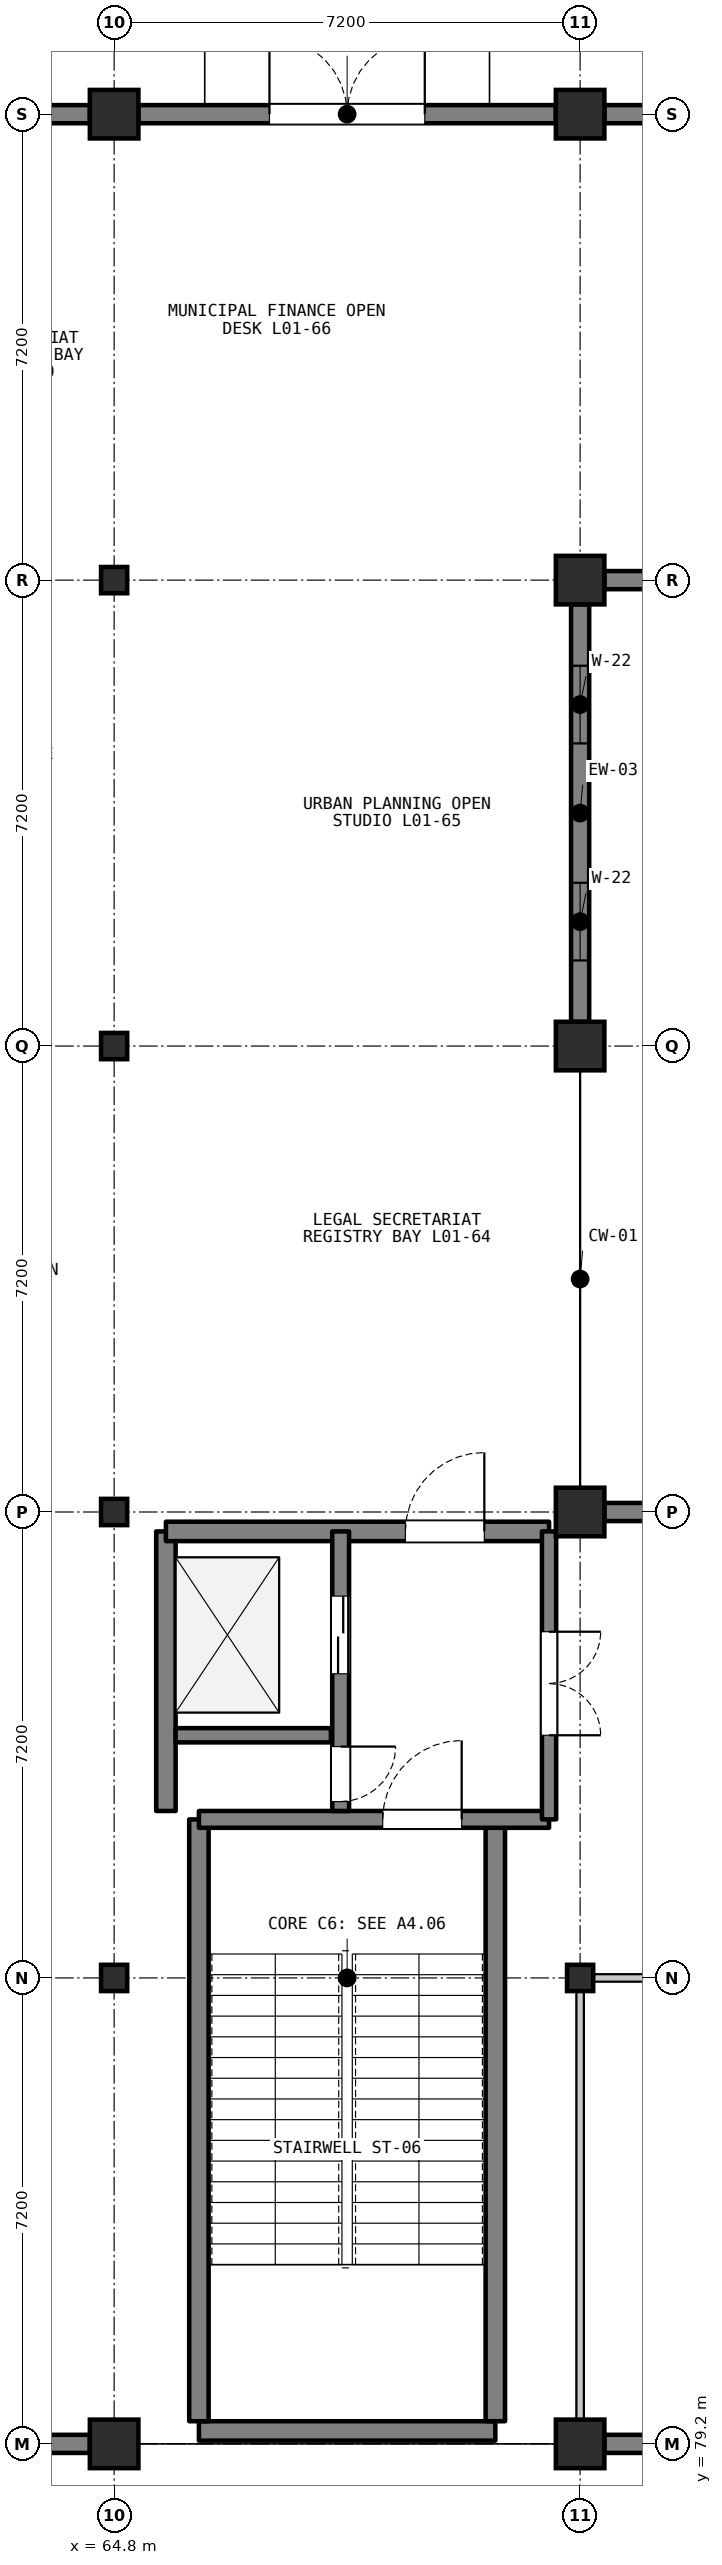
"""IFC4 building model, lengths in metres.
Left out: names, types, materials, properties, quantities, classifications, styles, units other than length and angle.
Written with IfcOpenShell. Run it as: python <this file> out.ifc"""

import sys

from ifc_helpers import new_model, si_unit, direction, frame, frame_2d, origin, origin_2d, place, context, subcontext, project, spatial, rectangle, i_section, extrude, element, fill, save


model = new_model("IFC4")
c1 = context("Model", 3, precision=1e-05, world=origin(), true_north=direction((0.0, 1.0)))
c2 = subcontext(c1, "Body", "Model", "MODEL_VIEW")
j1 = project(units=[si_unit("LENGTHUNIT", "METRE"), si_unit("PLANEANGLEUNIT", "RADIAN")], contexts=[c1])
p1 = place(None, origin())
s1 = spatial("IfcSite", under=j1, at=p1, CompositionType="ELEMENT")
p2 = place(p1, origin())
s2 = spatial("IfcBuilding", under=s1, at=p2, CompositionType="ELEMENT")
p3 = place(p2, origin())
s3 = spatial("IfcBuildingStorey", under=s2, at=p3, CompositionType="ELEMENT", Elevation=0.0)
p4 = place(p3, frame((64.8, 79.2, 0.0), z_axis=(0.0, 0.0, 1.0), x_axis=(1.0, 0.0, 0.0)))
e1 = element("IfcColumn", 1, at=p4, inside=s3, PredefinedType="COLUMN", context=c2, shape_type="SweptSolid", body=[
    extrude(rectangle(XDim=0.75, YDim=0.75, at=origin_2d()), origin(), (0.0, 0.0, 1.0), 5.4),
])
for number, where, z_axis, x_axis in (
    (2, (64.8, 86.4, 0.0), (0.0, 0.0, 1.0), (1.0, 0.0, 0.0)),
    (3, (64.8, 93.6, 0.0), (0.0, 0.0, 1.0), (1.0, 0.0, 0.0)),
    (4, (64.8, 100.8, 0.0), (0.0, 0.0, 1.0), (1.0, 0.0, 0.0)),
    (5, (64.8, 108.0, 0.0), (0.0, 0.0, 1.0), (1.0, 0.0, 0.0)),
):
    element("IfcColumn", number, at=place(p3, frame(where, z_axis=z_axis, x_axis=x_axis)), inside=s3, PredefinedType="COLUMN", context=c2, shape_type="SweptSolid", body=[
        extrude(i_section(OverallWidth=0.404, OverallDepth=0.406, WebThickness=0.027, FlangeThickness=0.044, FilletRadius=0.015, at=origin_2d()), origin(), (0.0, 0.0, 1.0), 5.4),
    ])
for number, where, z_axis, x_axis in (
    (6, (64.8, 115.2, 0.0), (0.0, 0.0, 1.0), (1.0, 0.0, 0.0)),
    (7, (72.0, 79.2, 0.0), (0.0, 0.0, 1.0), (1.0, 0.0, 0.0)),
):
    element("IfcColumn", number, at=place(p3, frame(where, z_axis=z_axis, x_axis=x_axis)), inside=s3, PredefinedType="COLUMN", context=c2, shape_type="SweptSolid", body=[
        extrude(rectangle(XDim=0.75, YDim=0.75, at=origin_2d()), origin(), (0.0, 0.0, 1.0), 5.4),
    ])
p5 = place(p3, frame((72.0, 86.4, 0.0), z_axis=(0.0, 0.0, 1.0), x_axis=(1.0, 0.0, 0.0)))
e8 = element("IfcColumn", 8, at=p5, inside=s3, PredefinedType="COLUMN", context=c2, shape_type="SweptSolid", body=[
    extrude(i_section(OverallWidth=0.404, OverallDepth=0.406, WebThickness=0.027, FlangeThickness=0.044, FilletRadius=0.015, at=origin_2d()), origin(), (0.0, 0.0, 1.0), 5.4),
])
for number, where, z_axis, x_axis in (
    (9, (72.0, 93.6, 0.0), (0.0, 0.0, 1.0), (1.0, 0.0, 0.0)),
    (10, (72.0, 100.8, 0.0), (0.0, 0.0, 1.0), (1.0, 0.0, 0.0)),
    (11, (72.0, 108.0, 0.0), (0.0, 0.0, 1.0), (1.0, 0.0, 0.0)),
    (12, (72.0, 115.2, 0.0), (0.0, 0.0, 1.0), (1.0, 0.0, 0.0)),
):
    element("IfcColumn", number, at=place(p3, frame(where, z_axis=z_axis, x_axis=x_axis)), inside=s3, PredefinedType="COLUMN", context=c2, shape_type="SweptSolid", body=[
        extrude(rectangle(XDim=0.75, YDim=0.75, at=origin_2d()), origin(), (0.0, 0.0, 1.0), 5.4),
    ])
p6 = place(p3, frame((64.425, 79.2, 0.0), z_axis=(0.0, 0.0, 1.0), x_axis=(-1.0, 0.0, 0.0)))
e13 = element("IfcWall", 13, at=p6, inside=s3, PredefinedType="SOLIDWALL", context=c2, shape_type="SweptSolid", body=[
    extrude(rectangle(XDim=6.45, YDim=0.28, at=frame_2d((3.225, 0.0))), origin(), (0.0, 0.0, 1.0), 4.598),
])
p7 = place(p3, frame((57.975, 115.2, 0.0), z_axis=(0.0, 0.0, 1.0), x_axis=(1.0, 0.0, 0.0)))
e14 = element("IfcWall", 14, at=p7, inside=s3, PredefinedType="SOLIDWALL", context=c2, shape_type="SweptSolid", body=[
    extrude(rectangle(XDim=6.45, YDim=0.28, at=frame_2d((3.225, 0.0))), origin(), (0.0, 0.0, 1.0), 4.598),
])
p8 = place(p7, frame((2.025, 0.0, 0.0)))
e15 = element("IfcOpeningElement", 15, at=p8, cuts=e14, PredefinedType="OPENING", context=c2, shape_type="SweptSolid", body=[
    extrude(rectangle(XDim=2.4, YDim=2.8, at=frame_2d((1.2, 1.4))), frame((0.0, 0.15, 0.0), z_axis=(0.0, -1.0, 0.0), x_axis=(1.0, 0.0, 0.0)), (0.0, 0.0, 1.0), 0.3),
])
p9 = place(p3, frame((72.0, 107.625, 0.0), z_axis=(0.0, 0.0, 1.0), x_axis=(0.0, -1.0, 0.0)))
e16 = element("IfcWall", 16, at=p9, inside=s3, PredefinedType="SOLIDWALL", context=c2, shape_type="SweptSolid", body=[
    extrude(rectangle(XDim=6.45, YDim=0.28, at=frame_2d((3.225, 0.0))), origin(), (0.0, 0.0, 1.0), 4.667),
])
p10 = place(p9, frame((0.948, 0.0, 0.95)))
e17 = element("IfcOpeningElement", 17, at=p10, cuts=e16, PredefinedType="OPENING", context=c2, shape_type="SweptSolid", body=[
    extrude(rectangle(XDim=1.2, YDim=1.7, at=frame_2d((0.6, 0.85))), frame((0.0, 0.15, 0.0), z_axis=(0.0, -1.0, 0.0), x_axis=(1.0, 0.0, 0.0)), (0.0, 0.0, 1.0), 0.3),
])
p11 = place(p9, frame((4.302, 0.0, 0.95)))
e18 = element("IfcOpeningElement", 18, at=p11, cuts=e16, PredefinedType="OPENING", context=c2, shape_type="SweptSolid", body=[
    extrude(rectangle(XDim=1.2, YDim=1.7, at=frame_2d((0.6, 0.85))), frame((0.0, 0.15, 0.0), z_axis=(0.0, -1.0, 0.0), x_axis=(1.0, 0.0, 0.0)), (0.0, 0.0, 1.0), 0.3),
])
p12 = place(p3, frame((65.175, 115.2, 0.0), z_axis=(0.0, 0.0, 1.0), x_axis=(1.0, 0.0, 0.0)))
e19 = element("IfcWall", 19, at=p12, inside=s3, PredefinedType="SOLIDWALL", context=c2, shape_type="SweptSolid", body=[
    extrude(rectangle(XDim=6.45, YDim=0.28, at=frame_2d((3.225, 0.0))), origin(), (0.0, 0.0, 1.0), 4.598),
])
p13 = place(p12, frame((2.025, 0.0, 0.0)))
e20 = element("IfcOpeningElement", 20, at=p13, cuts=e19, PredefinedType="OPENING", context=c2, shape_type="SweptSolid", body=[
    extrude(rectangle(XDim=2.4, YDim=2.8, at=frame_2d((1.2, 1.4))), frame((0.0, 0.15, 0.0), z_axis=(0.0, -1.0, 0.0), x_axis=(1.0, 0.0, 0.0)), (0.0, 0.0, 1.0), 0.3),
])
p14 = place(p3, frame((78.825, 79.2, 0.0), z_axis=(0.0, 0.0, 1.0), x_axis=(-1.0, 0.0, 0.0)))
e21 = element("IfcWall", 21, at=p14, inside=s3, PredefinedType="SOLIDWALL", context=c2, shape_type="SweptSolid", body=[
    extrude(rectangle(XDim=6.45, YDim=0.28, at=frame_2d((3.225, 0.0))), origin(), (0.0, 0.0, 1.0), 4.598),
])
p15 = place(p14, frame((0.948, 0.0, 0.95)))
e22 = element("IfcOpeningElement", 22, at=p15, cuts=e21, PredefinedType="OPENING", context=c2, shape_type="SweptSolid", body=[
    extrude(rectangle(XDim=1.2, YDim=1.7, at=frame_2d((0.6, 0.85))), frame((0.0, 0.15, 0.0), z_axis=(0.0, -1.0, 0.0), x_axis=(1.0, 0.0, 0.0)), (0.0, 0.0, 1.0), 0.3),
])
p16 = place(p14, frame((4.302, 0.0, 0.95)))
e23 = element("IfcOpeningElement", 23, at=p16, cuts=e21, PredefinedType="OPENING", context=c2, shape_type="SweptSolid", body=[
    extrude(rectangle(XDim=1.2, YDim=1.7, at=frame_2d((0.6, 0.85))), frame((0.0, 0.15, 0.0), z_axis=(0.0, -1.0, 0.0), x_axis=(1.0, 0.0, 0.0)), (0.0, 0.0, 1.0), 0.3),
])
p17 = place(p3, frame((72.375, 93.6, 0.0), z_axis=(0.0, 0.0, 1.0), x_axis=(1.0, 0.0, 0.0)))
e24 = element("IfcWall", 24, at=p17, inside=s3, PredefinedType="SOLIDWALL", context=c2, shape_type="SweptSolid", body=[
    extrude(rectangle(XDim=6.45, YDim=0.28, at=frame_2d((3.225, 0.0))), origin(), (0.0, 0.0, 1.0), 4.598),
])
p18 = place(p3, frame((78.825, 108.0, 0.0), z_axis=(0.0, 0.0, 1.0), x_axis=(-1.0, 0.0, 0.0)))
e25 = element("IfcWall", 25, at=p18, inside=s3, PredefinedType="SOLIDWALL", context=c2, shape_type="SweptSolid", body=[
    extrude(rectangle(XDim=6.45, YDim=0.28, at=frame_2d((3.225, 0.0))), origin(), (0.0, 0.0, 1.0), 4.598),
])
p19 = place(p18, frame((0.948, 0.0, 0.95)))
e26 = element("IfcOpeningElement", 26, at=p19, cuts=e25, PredefinedType="OPENING", context=c2, shape_type="SweptSolid", body=[
    extrude(rectangle(XDim=1.2, YDim=1.7, at=frame_2d((0.6, 0.85))), frame((0.0, 0.15, 0.0), z_axis=(0.0, -1.0, 0.0), x_axis=(1.0, 0.0, 0.0)), (0.0, 0.0, 1.0), 0.3),
])
p20 = place(p18, frame((4.302, 0.0, 0.95)))
e27 = element("IfcOpeningElement", 27, at=p20, cuts=e25, PredefinedType="OPENING", context=c2, shape_type="SweptSolid", body=[
    extrude(rectangle(XDim=1.2, YDim=1.7, at=frame_2d((0.6, 0.85))), frame((0.0, 0.15, 0.0), z_axis=(0.0, -1.0, 0.0), x_axis=(1.0, 0.0, 0.0)), (0.0, 0.0, 1.0), 0.3),
])
p21 = place(p3, frame((72.375, 115.2, 0.0), z_axis=(0.0, 0.0, 1.0), x_axis=(1.0, 0.0, 0.0)))
e28 = element("IfcWall", 28, at=p21, inside=s3, PredefinedType="SOLIDWALL", context=c2, shape_type="SweptSolid", body=[
    extrude(rectangle(XDim=6.45, YDim=0.28, at=frame_2d((3.225, 0.0))), origin(), (0.0, 0.0, 1.0), 4.598),
])
p22 = place(p21, frame((0.948, 0.0, 0.95)))
e29 = element("IfcOpeningElement", 29, at=p22, cuts=e28, PredefinedType="OPENING", context=c2, shape_type="SweptSolid", body=[
    extrude(rectangle(XDim=1.2, YDim=1.7, at=frame_2d((0.6, 0.85))), frame((0.0, 0.15, 0.0), z_axis=(0.0, -1.0, 0.0), x_axis=(1.0, 0.0, 0.0)), (0.0, 0.0, 1.0), 0.3),
])
p23 = place(p21, frame((4.302, 0.0, 0.95)))
e30 = element("IfcOpeningElement", 30, at=p23, cuts=e28, PredefinedType="OPENING", context=c2, shape_type="SweptSolid", body=[
    extrude(rectangle(XDim=1.2, YDim=1.7, at=frame_2d((0.6, 0.85))), frame((0.0, 0.15, 0.0), z_axis=(0.0, -1.0, 0.0), x_axis=(1.0, 0.0, 0.0)), (0.0, 0.0, 1.0), 0.3),
])
p24 = place(p3, frame((66.11, 79.4, 0.0), z_axis=(0.0, 0.0, 1.0), x_axis=(1.0, 0.0, 0.0)))
e31 = element("IfcWall", 31, at=p24, inside=s3, PredefinedType="SHEAR", context=c2, shape_type="SweptSolid", body=[
    extrude(rectangle(XDim=4.58, YDim=0.3, at=frame_2d((2.29, 0.0))), origin(), (0.0, 0.0, 1.0), 5.2),
])
for number, where, z_axis, x_axis in (
    (32, (66.11, 79.55, 0.0), (0.0, 0.0, 1.0), (0.0, 1.0, 0.0)),
    (33, (70.69, 79.55, 0.0), (0.0, 0.0, 1.0), (0.0, 1.0, 0.0)),
):
    element("IfcWall", number, at=place(p3, frame(where, z_axis=z_axis, x_axis=x_axis)), inside=s3, PredefinedType="SHEAR", context=c2, shape_type="SweptSolid", body=[
        extrude(rectangle(XDim=9.3, YDim=0.3, at=frame_2d((4.65, 0.0))), origin(), (0.0, 0.0, 1.0), 5.2),
    ])
p25 = place(p3, frame((66.11, 88.85, 0.0), z_axis=(0.0, 0.0, 1.0), x_axis=(1.0, 0.0, 0.0)))
e34 = element("IfcWall", 34, at=p25, inside=s3, PredefinedType="SHEAR", context=c2, shape_type="SweptSolid", body=[
    extrude(rectangle(XDim=5.41, YDim=0.26, at=frame_2d((2.705, 0.0))), origin(), (0.0, 0.0, 1.0), 5.2),
])
p26 = place(p25, frame((2.84, 0.0, 0.0)))
e35 = element("IfcOpeningElement", 35, at=p26, cuts=e34, PredefinedType="OPENING", context=c2, shape_type="SweptSolid", body=[
    extrude(rectangle(XDim=1.22, YDim=2.15, at=frame_2d((0.61, 1.075))), frame((0.0, 0.14, 0.0), z_axis=(0.0, -1.0, 0.0), x_axis=(1.0, 0.0, 0.0)), (0.0, 0.0, 1.0), 0.28),
])
p27 = place(p3, frame((65.6, 88.98, 0.0), z_axis=(0.0, 0.0, 1.0), x_axis=(0.0, 1.0, 0.0)))
e36 = element("IfcWall", 36, at=p27, inside=s3, PredefinedType="SHEAR", context=c2, shape_type="SweptSolid", body=[
    extrude(rectangle(XDim=4.32, YDim=0.3, at=frame_2d((2.16, 0.0))), origin(), (0.0, 0.0, 1.0), 5.2),
])
p28 = place(p3, frame((65.6, 93.3, 0.0), z_axis=(0.0, 0.0, 1.0), x_axis=(1.0, 0.0, 0.0)))
e37 = element("IfcWall", 37, at=p28, inside=s3, PredefinedType="SHEAR", context=c2, shape_type="SweptSolid", body=[
    extrude(rectangle(XDim=5.92, YDim=0.3, at=frame_2d((2.96, 0.0))), origin(), (0.0, 0.0, 1.0), 5.2),
])
p29 = place(p28, frame((3.7, 0.0, 0.0)))
e38 = element("IfcOpeningElement", 38, at=p29, cuts=e37, PredefinedType="OPENING", context=c2, shape_type="SweptSolid", body=[
    extrude(rectangle(XDim=1.22, YDim=2.15, at=frame_2d((0.61, 1.075))), frame((0.0, 0.16, 0.0), z_axis=(0.0, -1.0, 0.0), x_axis=(1.0, 0.0, 0.0)), (0.0, 0.0, 1.0), 0.32),
])
p30 = place(p3, frame((65.75, 90.15, 0.0), z_axis=(0.0, 0.0, 1.0), x_axis=(1.0, 0.0, 0.0)))
e39 = element("IfcWall", 39, at=p30, inside=s3, PredefinedType="SHEAR", context=c2, shape_type="SweptSolid", body=[
    extrude(rectangle(XDim=2.4, YDim=0.22, at=frame_2d((1.2, 0.0))), origin(), (0.0, 0.0, 1.0), 5.2),
])
p31 = place(p3, frame((68.3, 93.3, 0.0), z_axis=(0.0, 0.0, 1.0), x_axis=(0.0, -1.0, 0.0)))
e40 = element("IfcWall", 40, at=p31, inside=s3, PredefinedType="SHEAR", context=c2, shape_type="SweptSolid", body=[
    extrude(rectangle(XDim=4.32, YDim=0.26, at=frame_2d((2.16, 0.0))), origin(), (0.0, 0.0, 1.0), 5.2),
])
p32 = place(p31, frame((1.0, 0.0, 0.0)))
e41 = element("IfcOpeningElement", 41, at=p32, cuts=e40, PredefinedType="OPENING", context=c2, shape_type="SweptSolid", body=[
    extrude(rectangle(XDim=1.2, YDim=2.15, at=frame_2d((0.6, 1.075))), frame((0.0, 0.14, 0.0), z_axis=(0.0, -1.0, 0.0), x_axis=(1.0, 0.0, 0.0)), (0.0, 0.0, 1.0), 0.28),
])
p33 = place(p31, frame((3.325, 0.0, 0.0)))
e42 = element("IfcOpeningElement", 42, at=p33, cuts=e40, PredefinedType="OPENING", context=c2, shape_type="SweptSolid", body=[
    extrude(rectangle(XDim=0.85, YDim=2.05, at=frame_2d((0.425, 1.025))), frame((0.0, 0.14, 0.0), z_axis=(0.0, -1.0, 0.0), x_axis=(1.0, 0.0, 0.0)), (0.0, 0.0, 1.0), 0.28),
])
p34 = place(p3, frame((71.52, 93.3, 0.0), z_axis=(0.0, 0.0, 1.0), x_axis=(0.0, -1.0, 0.0)))
e43 = element("IfcWall", 43, at=p34, inside=s3, PredefinedType="SHEAR", context=c2, shape_type="SweptSolid", body=[
    extrude(rectangle(XDim=4.45, YDim=0.22, at=frame_2d((2.225, 0.0))), origin(), (0.0, 0.0, 1.0), 5.2),
])
p35 = place(p34, frame((1.55, 0.0, 0.0)))
e44 = element("IfcOpeningElement", 44, at=p35, cuts=e43, PredefinedType="OPENING", context=c2, shape_type="SweptSolid", body=[
    extrude(rectangle(XDim=1.6, YDim=2.2, at=frame_2d((0.8, 1.1))), frame((0.0, 0.12, 0.0), z_axis=(0.0, -1.0, 0.0), x_axis=(1.0, 0.0, 0.0)), (0.0, 0.0, 1.0), 0.24),
])
p36 = place(p3, frame((72.12, 86.4, 0.0), z_axis=(0.0, 0.0, 1.0), x_axis=(1.0, 0.0, 0.0)))
e45 = element("IfcWall", 45, at=p36, inside=s3, PredefinedType="PARTITIONING", context=c2, shape_type="SweptSolid", body=[
    extrude(rectangle(XDim=6.8, YDim=0.116, at=frame_2d((3.4, 0.0))), origin(), (0.0, 0.0, 1.0), 4.588),
])
p37 = place(p36, frame((2.51, 0.0, 0.0)))
e46 = element("IfcOpeningElement", 46, at=p37, cuts=e45, PredefinedType="OPENING", context=c2, shape_type="SweptSolid", body=[
    extrude(rectangle(XDim=1.78, YDim=2.36, at=frame_2d((0.89, 1.18))), frame((0.0, 0.068, 0.0), z_axis=(0.0, -1.0, 0.0), x_axis=(1.0, 0.0, 0.0)), (0.0, 0.0, 1.0), 0.136),
])
p38 = place(p3, frame((72.0, 79.32, 0.0), z_axis=(0.0, 0.0, 1.0), x_axis=(0.0, 1.0, 0.0)))
e47 = element("IfcWall", 47, at=p38, inside=s3, PredefinedType="PARTITIONING", context=c2, shape_type="SweptSolid", body=[
    extrude(rectangle(XDim=6.96, YDim=0.116, at=frame_2d((3.48, 0.0))), origin(), (0.0, 0.0, 1.0), 4.588),
])
p39 = place(p10, origin())
e48 = element("IfcWindow", 48, at=p39, inside=s3, PartitioningType="SINGLE_PANEL", PredefinedType="WINDOW", context=c2, shape_type="SweptSolid", body=[
    extrude(rectangle(XDim=1.2, YDim=1.7, at=frame_2d((0.6, 0.85))), frame((0.0, 0.03, 0.0), z_axis=(0.0, -1.0, 0.0), x_axis=(1.0, 0.0, 0.0)), (0.0, 0.0, 1.0), 0.06),
])
fill(e17, e48)
p40 = place(p11, origin())
e49 = element("IfcWindow", 49, at=p40, inside=s3, PartitioningType="SINGLE_PANEL", PredefinedType="WINDOW", context=c2, shape_type="SweptSolid", body=[
    extrude(rectangle(XDim=1.2, YDim=1.7, at=frame_2d((0.6, 0.85))), frame((0.0, 0.03, 0.0), z_axis=(0.0, -1.0, 0.0), x_axis=(1.0, 0.0, 0.0)), (0.0, 0.0, 1.0), 0.06),
])
fill(e18, e49)
p41 = place(p13, origin())
e50 = element("IfcDoor", 50, at=p41, inside=s3, OperationType="DOUBLE_DOOR_SINGLE_SWING", PredefinedType="DOOR", context=c2, shape_type="SweptSolid", body=[
    extrude(rectangle(XDim=2.4, YDim=2.8, at=frame_2d((1.2, 1.4))), frame((0.0, 0.025, 0.0), z_axis=(0.0, -1.0, 0.0), x_axis=(1.0, 0.0, 0.0)), (0.0, 0.0, 1.0), 0.05),
])
fill(e20, e50)
p42 = place(p26, origin())
e51 = element("IfcDoor", 51, at=p42, inside=s3, OperationType="SINGLE_SWING_RIGHT", PredefinedType="DOOR", context=c2, shape_type="SweptSolid", body=[
    extrude(rectangle(XDim=1.22, YDim=2.15, at=frame_2d((0.61, 1.075))), frame((0.0, 0.025, 0.0), z_axis=(0.0, -1.0, 0.0), x_axis=(1.0, 0.0, 0.0)), (0.0, 0.0, 1.0), 0.05),
])
fill(e35, e51)
p43 = place(p29, origin())
e52 = element("IfcDoor", 52, at=p43, inside=s3, OperationType="SINGLE_SWING_RIGHT", PredefinedType="DOOR", context=c2, shape_type="SweptSolid", body=[
    extrude(rectangle(XDim=1.22, YDim=2.15, at=frame_2d((0.61, 1.075))), frame((0.0, 0.025, 0.0), z_axis=(0.0, -1.0, 0.0), x_axis=(1.0, 0.0, 0.0)), (0.0, 0.0, 1.0), 0.05),
])
fill(e38, e52)
p44 = place(p32, origin())
e53 = element("IfcDoor", 53, at=p44, inside=s3, OperationType="DOUBLE_DOOR_SLIDING", PredefinedType="DOOR", context=c2, shape_type="SweptSolid", body=[
    extrude(rectangle(XDim=1.2, YDim=2.15, at=frame_2d((0.6, 1.075))), frame((0.0, 0.025, 0.0), z_axis=(0.0, -1.0, 0.0), x_axis=(1.0, 0.0, 0.0)), (0.0, 0.0, 1.0), 0.05),
])
fill(e41, e53)
p45 = place(p33, origin())
e54 = element("IfcDoor", 54, at=p45, inside=s3, OperationType="SINGLE_SWING_LEFT", PredefinedType="DOOR", context=c2, shape_type="SweptSolid", body=[
    extrude(rectangle(XDim=0.85, YDim=2.05, at=frame_2d((0.425, 1.025))), frame((0.0, 0.025, 0.0), z_axis=(0.0, -1.0, 0.0), x_axis=(1.0, 0.0, 0.0)), (0.0, 0.0, 1.0), 0.05),
])
fill(e42, e54)
p46 = place(p35, origin())
e55 = element("IfcDoor", 55, at=p46, inside=s3, OperationType="DOUBLE_DOOR_SINGLE_SWING", PredefinedType="DOOR", context=c2, shape_type="SweptSolid", body=[
    extrude(rectangle(XDim=1.6, YDim=2.2, at=frame_2d((0.8, 1.1))), frame((0.0, 0.025, 0.0), z_axis=(0.0, -1.0, 0.0), x_axis=(1.0, 0.0, 0.0)), (0.0, 0.0, 1.0), 0.05),
])
fill(e44, e55)
save(model, sys.argv[1])
